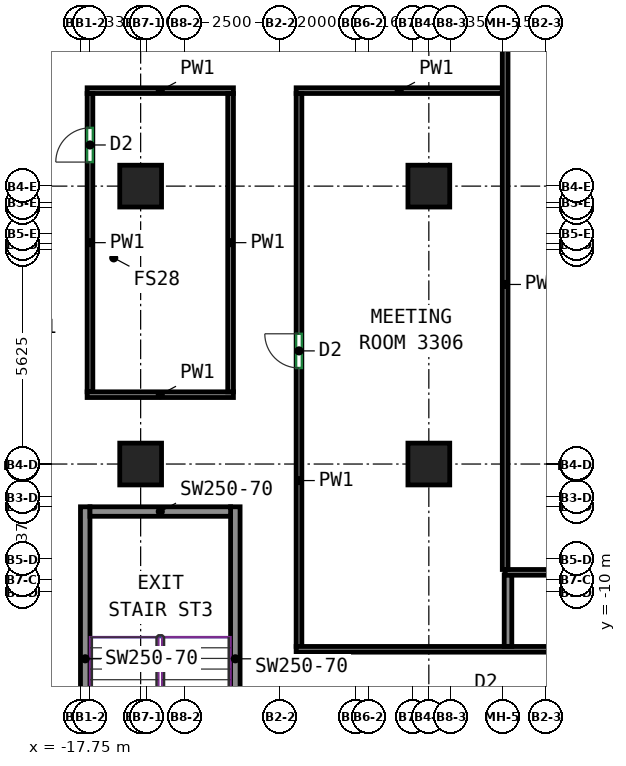
"""IFC4 building model, lengths in metres.
Left out: names, types, materials, properties, quantities, classifications, styles, units other than length and angle.
Written with IfcOpenShell. Run it as: python <this file> out.ifc"""

import sys

from ifc_helpers import new_model, si_unit, direction, frame, frame_2d, origin, origin_2d, place, context, subcontext, project, spatial, rectangle, extrude, source, transform, mapped, element, fill, save


model = new_model("IFC4")
c1 = context("Model", 3, precision=1e-05, world=origin(), true_north=direction((0.0, 1.0)))
c2 = subcontext(c1, "Body", "Model", "MODEL_VIEW")
j1 = project(units=[si_unit("LENGTHUNIT", "METRE"), si_unit("PLANEANGLEUNIT", "RADIAN")], contexts=[c1])
p1 = place(None, origin())
s1 = spatial("IfcSite", under=j1, at=p1, CompositionType="ELEMENT")
p2 = place(p1, origin())
s2 = spatial("IfcBuilding", under=s1, at=p2, CompositionType="ELEMENT")
p3 = place(p2, frame((0.0, 0.0, 147.3)))
s3 = spatial("IfcBuildingStorey", under=s2, at=p3, CompositionType="ELEMENT", Elevation=147.3)
m1 = source(origin(), c2, "Body", "SweptSolid", [
    extrude(rectangle(XDim=1.1, YDim=1.1, at=origin_2d()), origin(), (0.0, 0.0, 1.0), 3.12),
])
for number, where, z_axis, x_axis in (
    (1, (-16.167, -6.625, 0.0), (0.0, 0.0, 1.0), (1.0, 0.0, 0.0)),
    (2, (-16.167, 0.688, 0.0), (0.0, 0.0, 1.0), (1.0, 0.0, 0.0)),
    (3, (-8.583, -6.625, 0.0), (0.0, 0.0, 1.0), (1.0, 0.0, 0.0)),
    (4, (-8.583, 0.688, 0.0), (0.0, 0.0, 1.0), (1.0, 0.0, 0.0)),
):
    element("IfcColumn", number, at=place(p3, frame(where, z_axis=z_axis, x_axis=x_axis)), inside=s3, PredefinedType="COLUMN", context=c2, shape_type="MappedRepresentation", body=[
        mapped(m1, transform((0.0, 0.0, 0.0))),
    ])
m2 = source(origin(), c2, "Body", "SweptSolid", [
    extrude(rectangle(XDim=8.0, YDim=0.25, at=frame_2d((4.0, 0.0))), origin(), (0.0, 0.0, 1.0), 3.12),
])
for number, where, z_axis, x_axis in (
    (5, (-17.625, -15.75, 0.0), (0.0, 0.0, 1.0), (0.0, 1.0, 0.0)),
    (6, (-13.675, -15.75, 0.0), (0.0, 0.0, 1.0), (0.0, 1.0, 0.0)),
):
    element("IfcWall", number, at=place(p3, frame(where, z_axis=z_axis, x_axis=x_axis)), inside=s3, PredefinedType="SHEAR", context=c2, shape_type="MappedRepresentation", body=[
        mapped(m2, transform((0.0, 0.0, 0.0))),
    ])
m3 = source(origin(), c2, "Body", "SweptSolid", [
    extrude(rectangle(XDim=3.7, YDim=0.25, at=frame_2d((1.85, 0.0))), origin(), (0.0, 0.0, 1.0), 3.12),
])
p4 = place(p3, frame((-17.5, -7.875, 0.0), z_axis=(0.0, 0.0, 1.0), x_axis=(1.0, 0.0, 0.0)))
e7 = element("IfcWall", 7, at=p4, inside=s3, PredefinedType="SHEAR", context=c2, shape_type="MappedRepresentation", body=[
    mapped(m3, transform((0.0, 0.0, 0.0))),
])
p5 = place(p3, frame((-12.075, 3.2, 0.0), z_axis=(0.0, 0.0, 1.0), x_axis=(1.0, 0.0, 0.0)))
e8 = element("IfcWall", 8, at=p5, inside=s3, PredefinedType="PARTITIONING", context=c2, shape_type="SweptSolid", body=[
    extrude(rectangle(XDim=5.425, YDim=0.15, at=frame_2d((2.712, 0.0))), origin(), (0.0, 0.0, 1.0), 3.12),
])
p6 = place(p3, frame((-12.0, -11.425, 0.0), z_axis=(0.0, 0.0, 1.0), x_axis=(0.0, 1.0, 0.0)))
e9 = element("IfcWall", 9, at=p6, inside=s3, PredefinedType="PARTITIONING", context=c2, shape_type="SweptSolid", body=[
    extrude(rectangle(XDim=14.55, YDim=0.15, at=frame_2d((7.275, 0.0))), origin(), (0.0, 0.0, 1.0), 3.12),
])
p7 = place(p6, frame((7.327, 0.0, 0.0)))
e10 = element("IfcOpeningElement", 10, at=p7, cuts=e9, PredefinedType="OPENING", context=c2, shape_type="SweptSolid", body=[
    extrude(rectangle(XDim=0.9, YDim=2.1, at=frame_2d((0.45, 1.05))), frame((0.0, 0.085, 0.0), z_axis=(0.0, -1.0, 0.0), x_axis=(1.0, 0.0, 0.0)), (0.0, 0.0, 1.0), 0.17),
])
p8 = place(p3, frame((-12.075, -11.5, 0.0), z_axis=(0.0, 0.0, 1.0), x_axis=(1.0, 0.0, 0.0)))
e11 = element("IfcWall", 11, at=p8, inside=s3, PredefinedType="PARTITIONING", context=c2, shape_type="SweptSolid", body=[
    extrude(rectangle(XDim=28.35, YDim=0.15, at=frame_2d((14.175, 0.0))), origin(), (0.0, 0.0, 1.0), 3.12),
])
p9 = place(p8, frame((13.677, 0.0, 0.0)))
e12 = element("IfcOpeningElement", 12, at=p9, cuts=e11, PredefinedType="OPENING", context=c2, shape_type="SweptSolid", body=[
    extrude(rectangle(XDim=0.9, YDim=2.1, at=frame_2d((0.45, 1.05))), frame((0.0, 0.085, 0.0), z_axis=(0.0, -1.0, 0.0), x_axis=(1.0, 0.0, 0.0)), (0.0, 0.0, 1.0), 0.17),
])
p10 = place(p3, frame((-17.575, 3.2, 0.0), z_axis=(0.0, 0.0, 1.0), x_axis=(1.0, 0.0, 0.0)))
e13 = element("IfcWall", 13, at=p10, inside=s3, PredefinedType="PARTITIONING", context=c2, shape_type="SweptSolid", body=[
    extrude(rectangle(XDim=3.85, YDim=0.15, at=frame_2d((1.925, 0.0))), origin(), (0.0, 0.0, 1.0), 3.12),
])
p11 = place(p3, frame((-17.5, -4.725, 0.0), z_axis=(0.0, 0.0, 1.0), x_axis=(0.0, 1.0, 0.0)))
e14 = element("IfcWall", 14, at=p11, inside=s3, PredefinedType="PARTITIONING", context=c2, shape_type="SweptSolid", body=[
    extrude(rectangle(XDim=7.85, YDim=0.15, at=frame_2d((3.925, 0.0))), origin(), (0.0, 0.0, 1.0), 3.12),
])
p12 = place(p11, frame((6.045, 0.0, 0.0)))
e15 = element("IfcOpeningElement", 15, at=p12, cuts=e14, PredefinedType="OPENING", context=c2, shape_type="SweptSolid", body=[
    extrude(rectangle(XDim=0.9, YDim=2.1, at=frame_2d((0.45, 1.05))), frame((0.0, 0.085, 0.0), z_axis=(0.0, -1.0, 0.0), x_axis=(1.0, 0.0, 0.0)), (0.0, 0.0, 1.0), 0.17),
])
p13 = place(p3, frame((-13.725, -4.8, 0.0), z_axis=(0.0, 0.0, 1.0), x_axis=(-1.0, 0.0, 0.0)))
e16 = element("IfcWall", 16, at=p13, inside=s3, PredefinedType="PARTITIONING", context=c2, shape_type="SweptSolid", body=[
    extrude(rectangle(XDim=3.85, YDim=0.15, at=frame_2d((1.925, 0.0))), origin(), (0.0, 0.0, 1.0), 3.12),
])
p14 = place(p3, frame((-13.8, 3.125, 0.0), z_axis=(0.0, 0.0, 1.0), x_axis=(0.0, -1.0, 0.0)))
e17 = element("IfcWall", 17, at=p14, inside=s3, PredefinedType="PARTITIONING", context=c2, shape_type="SweptSolid", body=[
    extrude(rectangle(XDim=7.85, YDim=0.15, at=frame_2d((3.925, 0.0))), origin(), (0.0, 0.0, 1.0), 3.12),
])
p15 = place(p3, frame((-6.5, -11.423, 0.0), z_axis=(0.0, 0.0, 1.0), x_axis=(0.0, 1.0, 0.0)))
e18 = element("IfcWall", 18, at=p15, inside=s3, PredefinedType="PARTITIONING", context=c2, shape_type="SweptSolid", body=[
    extrude(rectangle(XDim=1.883, YDim=0.2, at=frame_2d((0.941, 0.0))), origin(), (0.0, 0.0, 1.0), 3.12),
])
p16 = place(p3, frame((8.5, -9.475, 0.0), z_axis=(0.0, 0.0, 1.0), x_axis=(-1.0, 0.0, 0.0)))
e19 = element("IfcWall", 19, at=p16, inside=s3, PredefinedType="PARTITIONING", context=c2, shape_type="SweptSolid", body=[
    extrude(rectangle(XDim=15.075, YDim=0.15, at=frame_2d((7.538, 0.0))), origin(), (0.0, 0.0, 1.0), 3.12),
])
p17 = place(p3, frame((-6.575, -9.4, 0.0), z_axis=(0.0, 0.0, 1.0), x_axis=(0.0, 1.0, 0.0)))
e20 = element("IfcWall", 20, at=p17, inside=s3, PredefinedType="PARTITIONING", context=c2, shape_type="SweptSolid", body=[
    extrude(rectangle(XDim=15.0, YDim=0.15, at=frame_2d((7.5, 0.0))), origin(), (0.0, 0.0, 1.0), 3.12),
])
p18 = place(p7, origin())
e21 = element("IfcDoor", 21, at=p18, inside=s3, OperationType="SINGLE_SWING_RIGHT", PredefinedType="DOOR", context=c2, shape_type="SweptSolid", body=[
    extrude(rectangle(XDim=0.9, YDim=2.1, at=frame_2d((0.45, 1.05))), frame((0.0, 0.025, 0.0), z_axis=(0.0, -1.0, 0.0), x_axis=(1.0, 0.0, 0.0)), (0.0, 0.0, 1.0), 0.05),
])
fill(e10, e21)
p19 = place(p12, origin())
e22 = element("IfcDoor", 22, at=p19, inside=s3, OperationType="SINGLE_SWING_LEFT", PredefinedType="DOOR", context=c2, shape_type="SweptSolid", body=[
    extrude(rectangle(XDim=0.9, YDim=2.1, at=frame_2d((0.45, 1.05))), frame((0.0, 0.025, 0.0), z_axis=(0.0, -1.0, 0.0), x_axis=(1.0, 0.0, 0.0)), (0.0, 0.0, 1.0), 0.05),
])
fill(e15, e22)
save(model, sys.argv[1])
